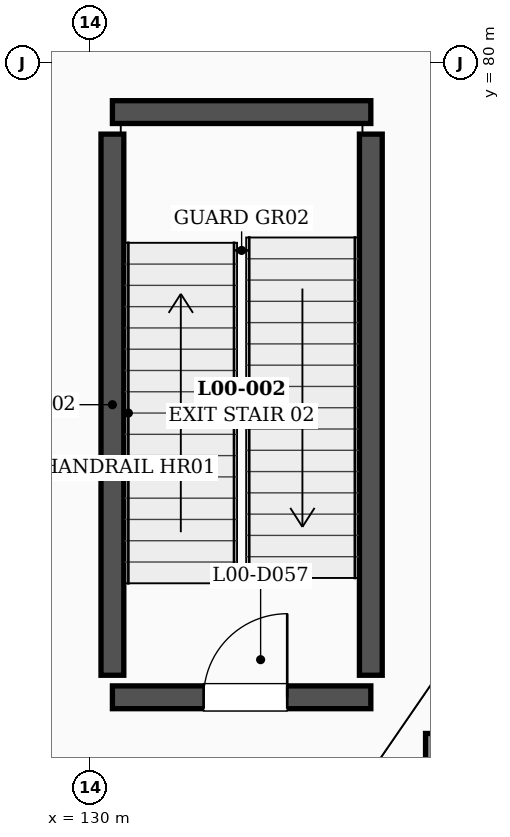
"""IFC4 building model, lengths in metres.
Left out: names, types, materials, properties, quantities, classifications, styles, units other than length and angle.
Written with IfcOpenShell. Run it as: python <this file> out.ifc"""

import sys

from ifc_helpers import new_model, si_unit, direction, frame, frame_2d, origin, place, context, subcontext, project, spatial, rectangle, extrude, element, fill, save


model = new_model("IFC4")
c1 = context("Model", 3, precision=1e-05, world=origin(), true_north=direction((0.0, 1.0)))
c2 = subcontext(c1, "Body", "Model", "MODEL_VIEW")
j1 = project(units=[si_unit("LENGTHUNIT", "METRE"), si_unit("PLANEANGLEUNIT", "RADIAN")], contexts=[c1])
p1 = place(None, origin())
s1 = spatial("IfcSite", under=j1, at=p1, CompositionType="ELEMENT")
p2 = place(p1, origin())
s2 = spatial("IfcBuilding", under=s1, at=p2, CompositionType="ELEMENT")
p3 = place(p2, origin())
s3 = spatial("IfcBuildingStorey", under=s2, at=p3, CompositionType="ELEMENT", Elevation=0.0)
p4 = place(p3, frame((139.322, 79.303, 0.0), z_axis=(0.0, 0.0, 1.0), x_axis=(-0.95182847269, 0.30663098111, 0.0)))
e1 = element("IfcWall", 1, at=p4, inside=s3, PredefinedType="SOLIDWALL", context=c2, shape_type="SweptSolid", body=[
    extrude(rectangle(XDim=9.785, YDim=0.34, at=frame_2d((4.893, 0.0))), origin(), (0.0, 0.0, 1.0), 4.83),
])
p5 = place(p4, frame((0.9, 0.0, 1.05)))
e2 = element("IfcOpeningElement", 2, at=p5, cuts=e1, PredefinedType="OPENING", context=c2, shape_type="SweptSolid", body=[
    extrude(rectangle(XDim=3.3, YDim=2.6, at=frame_2d((1.65, 1.3))), frame((0.0, 0.18, 0.0), z_axis=(0.0, -1.0, 0.0), x_axis=(1.0, 0.0, 0.0)), (0.0, 0.0, 1.0), 0.36),
])
p6 = place(p4, frame((5.585, 0.0, 1.05)))
e3 = element("IfcOpeningElement", 3, at=p6, cuts=e1, PredefinedType="OPENING", context=c2, shape_type="SweptSolid", body=[
    extrude(rectangle(XDim=3.3, YDim=2.6, at=frame_2d((1.65, 1.3))), frame((0.0, 0.18, 0.0), z_axis=(0.0, -1.0, 0.0), x_axis=(1.0, 0.0, 0.0)), (0.0, 0.0, 1.0), 0.36),
])
p7 = place(p3, frame((130.3, 71.65, 0.0), z_axis=(0.0, 0.0, 1.0), x_axis=(1.0, 0.0, 0.0)))
e4 = element("IfcWall", 4, at=p7, inside=s3, PredefinedType="SHEAR", context=c2, shape_type="SweptSolid", body=[
    extrude(rectangle(XDim=3.4, YDim=0.3, at=frame_2d((1.7, 0.0))), origin(), (0.0, 0.0, 1.0), 6.0),
])
p8 = place(p7, frame((1.2, 0.0, 0.0)))
e5 = element("IfcOpeningElement", 5, at=p8, cuts=e4, PredefinedType="OPENING", context=c2, shape_type="SweptSolid", body=[
    extrude(rectangle(XDim=1.1, YDim=2.2, at=frame_2d((0.55, 1.1))), frame((0.0, 0.16, 0.0), z_axis=(0.0, -1.0, 0.0), x_axis=(1.0, 0.0, 0.0)), (0.0, 0.0, 1.0), 0.32),
])
p9 = place(p3, frame((130.3, 79.35, 0.0), z_axis=(0.0, 0.0, 1.0), x_axis=(1.0, 0.0, 0.0)))
e6 = element("IfcWall", 6, at=p9, inside=s3, PredefinedType="SHEAR", context=c2, shape_type="SweptSolid", body=[
    extrude(rectangle(XDim=3.4, YDim=0.3, at=frame_2d((1.7, 0.0))), origin(), (0.0, 0.0, 1.0), 6.0),
])
for number, where, z_axis, x_axis in (
    (7, (130.3, 71.94, 0.0), (0.0, 0.0, 1.0), (0.0, 1.0, 0.0)),
    (8, (133.7, 71.94, 0.0), (0.0, 0.0, 1.0), (0.0, 1.0, 0.0)),
):
    element("IfcWall", number, at=place(p3, frame(where, z_axis=z_axis, x_axis=x_axis)), inside=s3, PredefinedType="SHEAR", context=c2, shape_type="SweptSolid", body=[
        extrude(rectangle(XDim=7.12, YDim=0.3, at=frame_2d((3.56, 0.0))), origin(), (0.0, 0.0, 1.0), 6.0),
    ])
p10 = place(p3, frame((134.54, 68.482, 0.0), z_axis=(0.0, 0.0, 1.0), x_axis=(0.0, 1.0, 0.0)))
e9 = element("IfcWall", 9, at=p10, inside=s3, PredefinedType="PARTITIONING", context=c2, shape_type="SweptSolid", body=[
    extrude(rectangle(XDim=2.692, YDim=0.24, at=frame_2d((1.346, 0.0))), origin(), (0.0, 0.0, 1.0), 5.68),
])
p11 = place(p8, origin())
e10 = element("IfcDoor", 10, at=p11, inside=s3, OperationType="SINGLE_SWING_RIGHT", PredefinedType="DOOR", context=c2, shape_type="SweptSolid", body=[
    extrude(rectangle(XDim=1.1, YDim=2.2, at=frame_2d((0.55, 1.1))), frame((0.0, 0.025, 0.0), z_axis=(0.0, -1.0, 0.0), x_axis=(1.0, 0.0, 0.0)), (0.0, 0.0, 1.0), 0.05),
])
fill(e5, e10)
save(model, sys.argv[1])
